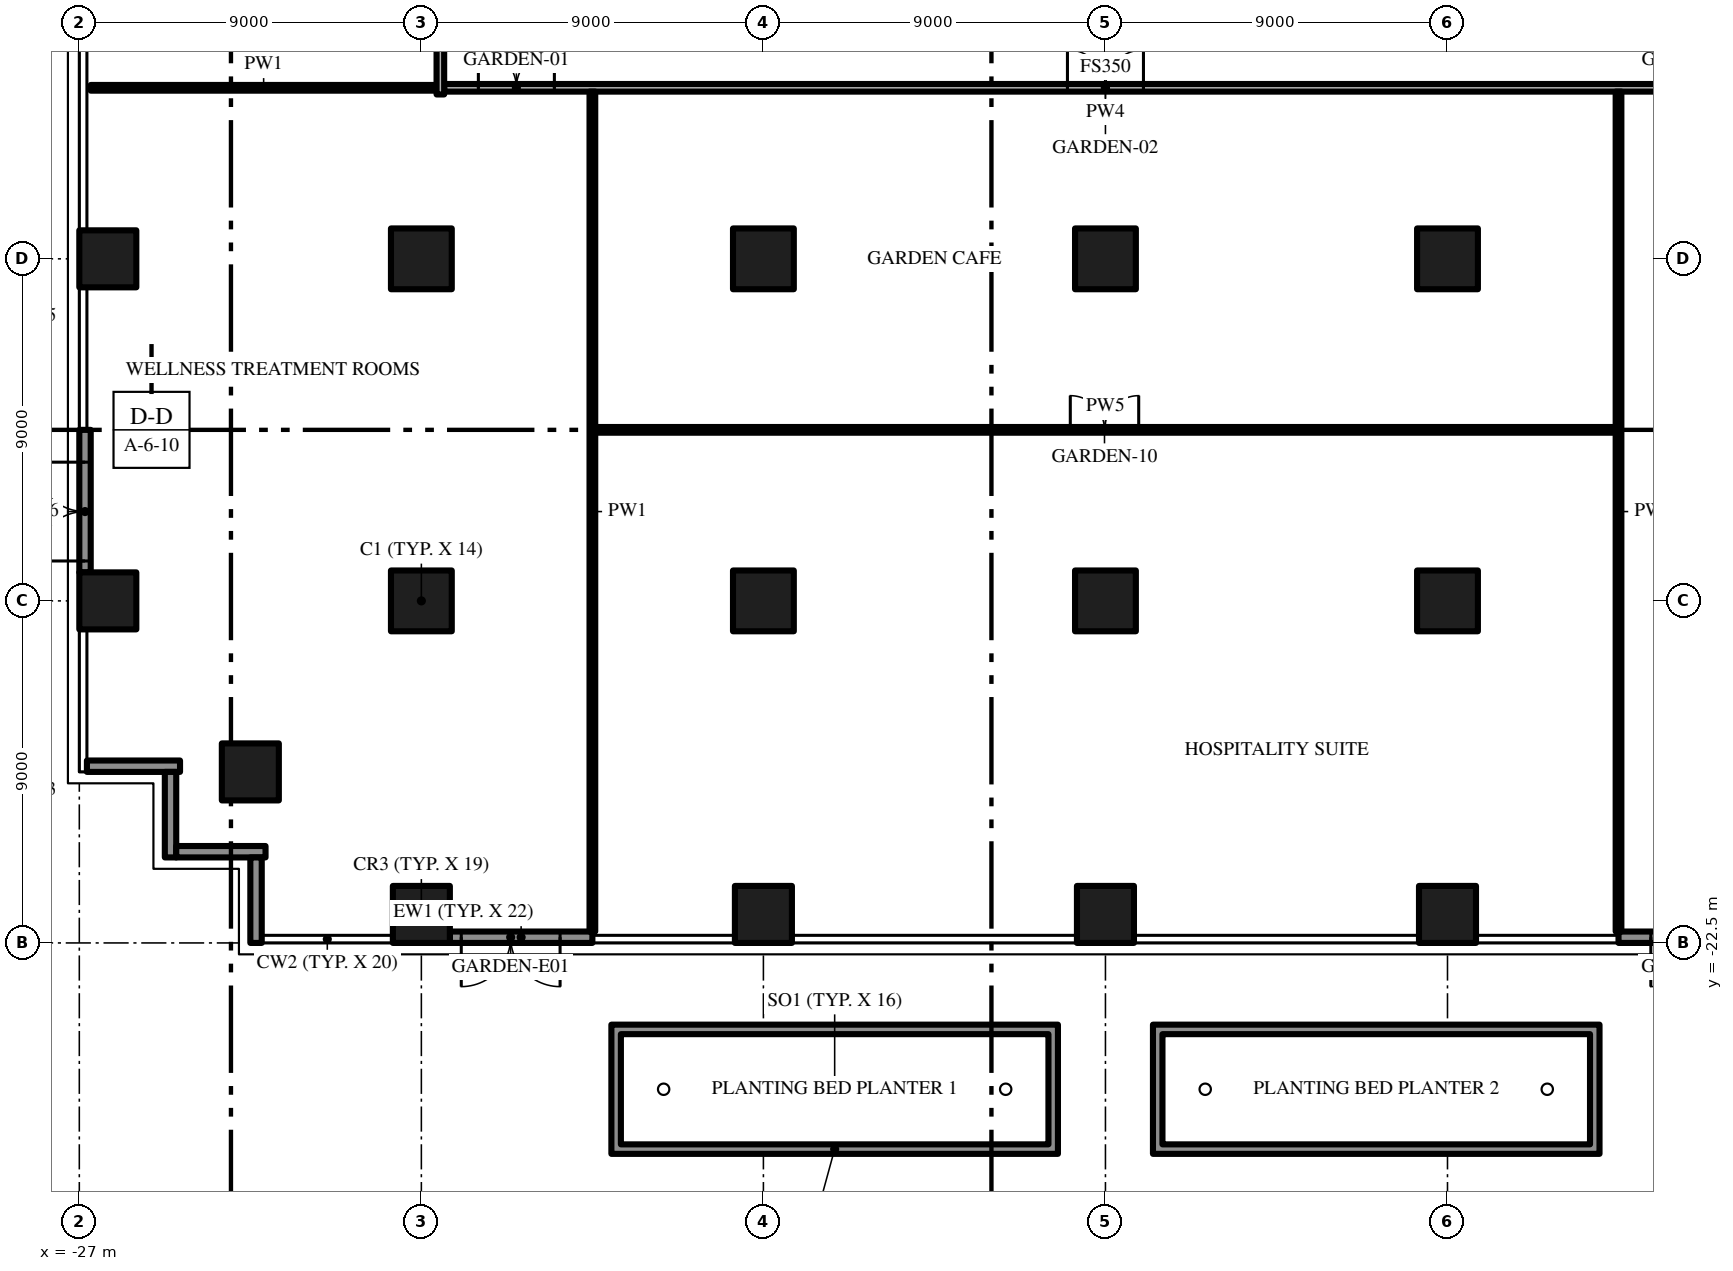
"""IFC4 building model, lengths in metres.
Left out: names, types, materials, properties, quantities, classifications, styles, units other than length and angle.
Written with IfcOpenShell. Run it as: python <this file> out.ifc"""

import sys

from ifc_helpers import new_model, si_unit, direction, frame, frame_2d, origin, origin_2d, place, context, subcontext, project, spatial, polyline, rectangle, outline, extrude, element, fill, save


model = new_model("IFC4")
c1 = context("Model", 3, precision=1e-05, world=origin(), true_north=direction((0.0, 1.0)))
c2 = subcontext(c1, "Body", "Model", "MODEL_VIEW")
j1 = project(units=[si_unit("LENGTHUNIT", "METRE"), si_unit("PLANEANGLEUNIT", "RADIAN")], contexts=[c1])
p1 = place(None, origin())
s1 = spatial("IfcSite", under=j1, at=p1, CompositionType="ELEMENT")
p2 = place(p1, origin())
s2 = spatial("IfcBuilding", under=s1, at=p2, CompositionType="ELEMENT")
p3 = place(p2, frame((0.0, 0.0, 10.5)))
s3 = spatial("IfcBuildingStorey", under=s2, at=p3, CompositionType="ELEMENT", Elevation=10.5)
p4 = place(p3, frame((-18.0, -13.5, 0.0), z_axis=(0.0, 0.0, 1.0), x_axis=(1.0, 0.0, 0.0)))
e1 = element("IfcColumn", 1, at=p4, inside=s3, PredefinedType="COLUMN", context=c2, shape_type="SweptSolid", body=[
    extrude(rectangle(XDim=1.6, YDim=1.6, at=origin_2d()), origin(), (0.0, 0.0, 1.0), 4.2),
])
p5 = place(p3, frame((-18.0, -21.75, 0.0), z_axis=(0.0, 0.0, 1.0), x_axis=(1.0, 0.0, 0.0)))
e2 = element("IfcColumn", 2, at=p5, inside=s3, PredefinedType="COLUMN", context=c2, shape_type="SweptSolid", body=[
    extrude(rectangle(XDim=1.5, YDim=1.5, at=origin_2d()), origin(), (0.0, 0.0, 1.0), 4.2),
])
p6 = place(p3, frame((-18.0, -4.5, 0.0), z_axis=(0.0, 0.0, 1.0), x_axis=(1.0, 0.0, 0.0)))
e3 = element("IfcColumn", 3, at=p6, inside=s3, PredefinedType="COLUMN", context=c2, shape_type="SweptSolid", body=[
    extrude(rectangle(XDim=1.6, YDim=1.6, at=origin_2d()), origin(), (0.0, 0.0, 1.0), 4.2),
])
for number, where, z_axis, x_axis in (
    (4, (-26.25, -13.5, 0.0), (0.0, 0.0, 1.0), (1.0, 0.0, 0.0)),
    (5, (-22.5, -18.0, 0.0), (0.0, 0.0, 1.0), (1.0, 0.0, 0.0)),
    (6, (-26.25, -4.5, 0.0), (0.0, 0.0, 1.0), (1.0, 0.0, 0.0)),
):
    element("IfcColumn", number, at=place(p3, frame(where, z_axis=z_axis, x_axis=x_axis)), inside=s3, PredefinedType="COLUMN", context=c2, shape_type="SweptSolid", body=[
        extrude(rectangle(XDim=1.5, YDim=1.5, at=origin_2d()), origin(), (0.0, 0.0, 1.0), 4.2),
    ])
p7 = place(p3, frame((-9.0, -13.5, 0.0), z_axis=(0.0, 0.0, 1.0), x_axis=(1.0, 0.0, 0.0)))
e7 = element("IfcColumn", 7, at=p7, inside=s3, PredefinedType="COLUMN", context=c2, shape_type="SweptSolid", body=[
    extrude(rectangle(XDim=1.6, YDim=1.6, at=origin_2d()), origin(), (0.0, 0.0, 1.0), 4.2),
])
p8 = place(p3, frame((-9.0, -21.75, 0.0), z_axis=(0.0, 0.0, 1.0), x_axis=(1.0, 0.0, 0.0)))
e8 = element("IfcColumn", 8, at=p8, inside=s3, PredefinedType="COLUMN", context=c2, shape_type="SweptSolid", body=[
    extrude(rectangle(XDim=1.5, YDim=1.5, at=origin_2d()), origin(), (0.0, 0.0, 1.0), 4.2),
])
for number, where, z_axis, x_axis in (
    (9, (-9.0, -4.5, 0.0), (0.0, 0.0, 1.0), (1.0, 0.0, 0.0)),
    (10, (0.0, -13.5, 0.0), (0.0, 0.0, 1.0), (1.0, 0.0, 0.0)),
):
    element("IfcColumn", number, at=place(p3, frame(where, z_axis=z_axis, x_axis=x_axis)), inside=s3, PredefinedType="COLUMN", context=c2, shape_type="SweptSolid", body=[
        extrude(rectangle(XDim=1.6, YDim=1.6, at=origin_2d()), origin(), (0.0, 0.0, 1.0), 4.2),
    ])
p9 = place(p3, frame((0.0, -21.75, 0.0), z_axis=(0.0, 0.0, 1.0), x_axis=(1.0, 0.0, 0.0)))
e11 = element("IfcColumn", 11, at=p9, inside=s3, PredefinedType="COLUMN", context=c2, shape_type="SweptSolid", body=[
    extrude(rectangle(XDim=1.5, YDim=1.5, at=origin_2d()), origin(), (0.0, 0.0, 1.0), 4.2),
])
for number, where, z_axis, x_axis in (
    (12, (0.0, -4.5, 0.0), (0.0, 0.0, 1.0), (1.0, 0.0, 0.0)),
    (13, (9.0, -13.5, 0.0), (0.0, 0.0, 1.0), (1.0, 0.0, 0.0)),
):
    element("IfcColumn", number, at=place(p3, frame(where, z_axis=z_axis, x_axis=x_axis)), inside=s3, PredefinedType="COLUMN", context=c2, shape_type="SweptSolid", body=[
        extrude(rectangle(XDim=1.6, YDim=1.6, at=origin_2d()), origin(), (0.0, 0.0, 1.0), 4.2),
    ])
p10 = place(p3, frame((9.0, -21.75, 0.0), z_axis=(0.0, 0.0, 1.0), x_axis=(1.0, 0.0, 0.0)))
e14 = element("IfcColumn", 14, at=p10, inside=s3, PredefinedType="COLUMN", context=c2, shape_type="SweptSolid", body=[
    extrude(rectangle(XDim=1.5, YDim=1.5, at=origin_2d()), origin(), (0.0, 0.0, 1.0), 4.2),
])
p11 = place(p3, frame((9.0, -4.5, 0.0), z_axis=(0.0, 0.0, 1.0), x_axis=(1.0, 0.0, 0.0)))
e15 = element("IfcColumn", 15, at=p11, inside=s3, PredefinedType="COLUMN", context=c2, shape_type="SweptSolid", body=[
    extrude(rectangle(XDim=1.6, YDim=1.6, at=origin_2d()), origin(), (0.0, 0.0, 1.0), 4.2),
])
p12 = place(p3, frame((-13.5, -22.35, 0.0), z_axis=(0.0, 0.0, 1.0), x_axis=(-1.0, 0.0, 0.0)))
e16 = element("IfcWall", 16, at=p12, inside=s3, PredefinedType="SOLIDWALL", context=c2, shape_type="SweptSolid", body=[
    extrude(rectangle(XDim=3.75, YDim=0.3, at=frame_2d((1.875, 0.0))), origin(), (0.0, 0.0, 1.0), 4.2),
])
p13 = place(p12, frame((0.85, 0.0, 0.0)))
e17 = element("IfcOpeningElement", 17, at=p13, cuts=e16, PredefinedType="OPENING", context=c2, shape_type="SweptSolid", body=[
    extrude(rectangle(XDim=2.6, YDim=2.4, at=frame_2d((1.3, 1.2))), frame((0.0, 0.16, 0.0), z_axis=(0.0, -1.0, 0.0), x_axis=(1.0, 0.0, 0.0)), (0.0, 0.0, 1.0), 0.32),
])
p14 = place(p3, frame((17.25, -22.35, 0.0), z_axis=(0.0, 0.0, 1.0), x_axis=(-1.0, 0.0, 0.0)))
e18 = element("IfcWall", 18, at=p14, inside=s3, PredefinedType="SOLIDWALL", context=c2, shape_type="SweptSolid", body=[
    extrude(rectangle(XDim=3.75, YDim=0.3, at=frame_2d((1.875, 0.0))), origin(), (0.0, 0.0, 1.0), 4.2),
])
p15 = place(p14, frame((0.3, 0.0, 0.0)))
e19 = element("IfcOpeningElement", 19, at=p15, cuts=e18, PredefinedType="OPENING", context=c2, shape_type="SweptSolid", body=[
    extrude(rectangle(XDim=2.6, YDim=2.4, at=frame_2d((1.3, 1.2))), frame((0.0, 0.16, 0.0), z_axis=(0.0, -1.0, 0.0), x_axis=(1.0, 0.0, 0.0)), (0.0, 0.0, 1.0), 0.32),
])
p16 = place(p3, frame((-26.85, -12.75, 0.0), z_axis=(0.0, 0.0, 1.0), x_axis=(0.0, 1.0, 0.0)))
e20 = element("IfcWall", 20, at=p16, inside=s3, PredefinedType="SOLIDWALL", context=c2, shape_type="SweptSolid", body=[
    extrude(rectangle(XDim=3.75, YDim=0.3, at=frame_2d((1.875, 0.0))), origin(), (0.0, 0.0, 1.0), 4.2),
])
p17 = place(p16, frame((0.3, 0.0, 0.0)))
e21 = element("IfcOpeningElement", 21, at=p17, cuts=e20, PredefinedType="OPENING", context=c2, shape_type="SweptSolid", body=[
    extrude(rectangle(XDim=2.6, YDim=2.4, at=frame_2d((1.3, 1.2))), frame((0.0, 0.16, 0.0), z_axis=(0.0, -1.0, 0.0), x_axis=(1.0, 0.0, 0.0)), (0.0, 0.0, 1.0), 0.32),
])
p18 = place(p3, frame((-24.35, -17.85, 0.0), z_axis=(0.0, 0.0, 1.0), x_axis=(-1.0, 0.0, 0.0)))
e22 = element("IfcWall", 22, at=p18, inside=s3, PredefinedType="SOLIDWALL", context=c2, shape_type="SweptSolid", body=[
    extrude(rectangle(XDim=2.45, YDim=0.3, at=frame_2d((1.225, 0.0))), origin(), (0.0, 0.0, 1.0), 4.2),
])
p19 = place(p3, frame((-24.6, -20.25, 0.0), z_axis=(0.0, 0.0, 1.0), x_axis=(0.0, 1.0, 0.0)))
e23 = element("IfcWall", 23, at=p19, inside=s3, PredefinedType="SOLIDWALL", context=c2, shape_type="SweptSolid", body=[
    extrude(rectangle(XDim=2.25, YDim=0.3, at=frame_2d((1.125, 0.0))), origin(), (0.0, 0.0, 1.0), 4.2),
])
p20 = place(p3, frame((-22.1, -20.1, 0.0), z_axis=(0.0, 0.0, 1.0), x_axis=(-1.0, 0.0, 0.0)))
e24 = element("IfcWall", 24, at=p20, inside=s3, PredefinedType="SOLIDWALL", context=c2, shape_type="SweptSolid", body=[
    extrude(rectangle(XDim=2.35, YDim=0.3, at=frame_2d((1.175, 0.0))), origin(), (0.0, 0.0, 1.0), 4.2),
])
p21 = place(p3, frame((-22.35, -22.5, 0.0), z_axis=(0.0, 0.0, 1.0), x_axis=(0.0, 1.0, 0.0)))
e25 = element("IfcWall", 25, at=p21, inside=s3, PredefinedType="SOLIDWALL", context=c2, shape_type="SweptSolid", body=[
    extrude(rectangle(XDim=2.25, YDim=0.3, at=frame_2d((1.125, 0.0))), origin(), (0.0, 0.0, 1.0), 4.2),
])
p22 = place(p3, frame((-13.425, -9.0, 0.0), z_axis=(0.0, 0.0, 1.0), x_axis=(1.0, 0.0, 0.0)))
e26 = element("IfcWall", 26, at=p22, inside=s3, PredefinedType="PARTITIONING", context=c2, shape_type="SweptSolid", body=[
    extrude(rectangle(XDim=26.85, YDim=0.15, at=frame_2d((13.425, 0.0))), origin(), (0.0, 0.0, 1.0), 4.2),
])
p23 = place(p22, frame((12.5, 0.0, 0.0)))
e27 = element("IfcOpeningElement", 27, at=p23, cuts=e26, PredefinedType="OPENING", context=c2, shape_type="SweptSolid", body=[
    extrude(rectangle(XDim=1.8, YDim=2.4, at=frame_2d((0.9, 1.2))), frame((0.0, 0.085, 0.0), z_axis=(0.0, -1.0, 0.0), x_axis=(1.0, 0.0, 0.0)), (0.0, 0.0, 1.0), 0.17),
])
p24 = place(p3, frame((-17.4, 0.0, 0.0), z_axis=(0.0, 0.0, 1.0), x_axis=(1.0, 0.0, 0.0)))
e28 = element("IfcWall", 28, at=p24, inside=s3, PredefinedType="PARTITIONING", context=c2, shape_type="SweptSolid", body=[
    extrude(rectangle(XDim=34.8, YDim=0.2, at=frame_2d((17.4, 0.0))), origin(), (0.0, 0.0, 1.0), 4.2),
])
p25 = place(p24, frame((0.9, 0.0, 0.0)))
e29 = element("IfcOpeningElement", 29, at=p25, cuts=e28, PredefinedType="OPENING", context=c2, shape_type="SweptSolid", body=[
    extrude(rectangle(XDim=2.0, YDim=2.4, at=frame_2d((1.0, 1.2))), frame((0.0, 0.11, 0.0), z_axis=(0.0, -1.0, 0.0), x_axis=(1.0, 0.0, 0.0)), (0.0, 0.0, 1.0), 0.22),
])
p26 = place(p24, frame((16.4, 0.0, 0.0)))
e30 = element("IfcOpeningElement", 30, at=p26, cuts=e28, PredefinedType="OPENING", context=c2, shape_type="SweptSolid", body=[
    extrude(rectangle(XDim=2.0, YDim=2.4, at=frame_2d((1.0, 1.2))), frame((0.0, 0.11, 0.0), z_axis=(0.0, -1.0, 0.0), x_axis=(1.0, 0.0, 0.0)), (0.0, 0.0, 1.0), 0.22),
])
p27 = place(p24, frame((31.9, 0.0, 0.0)))
e31 = element("IfcOpeningElement", 31, at=p27, cuts=e28, PredefinedType="OPENING", context=c2, shape_type="SweptSolid", body=[
    extrude(rectangle(XDim=2.0, YDim=2.4, at=frame_2d((1.0, 1.2))), frame((0.0, 0.11, 0.0), z_axis=(0.0, -1.0, 0.0), x_axis=(1.0, 0.0, 0.0)), (0.0, 0.0, 1.0), 0.22),
])
p28 = place(p3, frame((-26.7, 0.0, 0.0), z_axis=(0.0, 0.0, 1.0), x_axis=(1.0, 0.0, 0.0)))
e32 = element("IfcWall", 32, at=p28, inside=s3, PredefinedType="PARTITIONING", context=c2, shape_type="SweptSolid", body=[
    extrude(rectangle(XDim=9.1, YDim=0.15, at=frame_2d((4.55, 0.0))), origin(), (0.0, 0.0, 1.0), 4.2),
])
p29 = place(p3, frame((-17.5, -0.175, 0.0), z_axis=(0.0, 0.0, 1.0), x_axis=(0.0, 1.0, 0.0)))
e33 = element("IfcWall", 33, at=p29, inside=s3, PredefinedType="PARTITIONING", context=c2, shape_type="SweptSolid", body=[
    extrude(rectangle(XDim=3.875, YDim=0.2, at=frame_2d((1.938, 0.0))), origin(), (0.0, 0.0, 1.0), 4.2),
])
for number, where, z_axis, x_axis in (
    (34, (-13.5, -22.2, 0.0), (0.0, 0.0, 1.0), (0.0, 1.0, 0.0)),
    (35, (13.5, -22.2, 0.0), (0.0, 0.0, 1.0), (0.0, 1.0, 0.0)),
):
    element("IfcWall", number, at=place(p3, frame(where, z_axis=z_axis, x_axis=x_axis)), inside=s3, PredefinedType="PARTITIONING", context=c2, shape_type="SweptSolid", body=[
        extrude(rectangle(XDim=22.1, YDim=0.15, at=frame_2d((11.05, 0.0))), origin(), (0.0, 0.0, 1.0), 4.2),
    ])
p30 = place(p3, frame((0.0, 0.0, 0.05)))
e36 = element("IfcWall", 36, at=p30, inside=s3, PredefinedType="USERDEFINED", context=c2, shape_type="SweptSolid", body=[
    extrude(outline(polyline([(-13.0, -28.05), (-1.25, -28.05), (-1.25, -24.65), (-13.0, -24.65), (-13.0, -28.05)]), holes=[polyline([(-12.75, -24.9), (-1.5, -24.9), (-1.5, -27.8), (-12.75, -27.8), (-12.75, -24.9)])]), origin(), (0.0, 0.0, 1.0), 0.9),
])
p31 = place(p3, frame((0.0, 0.0, 0.05)))
e37 = element("IfcWall", 37, at=p31, inside=s3, PredefinedType="USERDEFINED", context=c2, shape_type="SweptSolid", body=[
    extrude(outline(polyline([(1.25, -28.05), (13.0, -28.05), (13.0, -24.65), (1.25, -24.65), (1.25, -28.05)]), holes=[polyline([(1.5, -24.9), (12.75, -24.9), (12.75, -27.8), (1.5, -27.8), (1.5, -24.9)])]), origin(), (0.0, 0.0, 1.0), 0.9),
])
p32 = place(p13, origin())
e38 = element("IfcDoor", 38, at=p32, inside=s3, OperationType="SINGLE_SWING_LEFT", PredefinedType="DOOR", context=c2, shape_type="SweptSolid", body=[
    extrude(rectangle(XDim=2.6, YDim=2.4, at=frame_2d((1.3, 1.2))), frame((0.0, 0.025, 0.0), z_axis=(0.0, -1.0, 0.0), x_axis=(1.0, 0.0, 0.0)), (0.0, 0.0, 1.0), 0.05),
])
fill(e17, e38)
p33 = place(p15, origin())
e39 = element("IfcDoor", 39, at=p33, inside=s3, OperationType="SINGLE_SWING_LEFT", PredefinedType="DOOR", context=c2, shape_type="SweptSolid", body=[
    extrude(rectangle(XDim=2.6, YDim=2.4, at=frame_2d((1.3, 1.2))), frame((0.0, 0.025, 0.0), z_axis=(0.0, -1.0, 0.0), x_axis=(1.0, 0.0, 0.0)), (0.0, 0.0, 1.0), 0.05),
])
fill(e19, e39)
p34 = place(p17, origin())
e40 = element("IfcDoor", 40, at=p34, inside=s3, OperationType="SINGLE_SWING_LEFT", PredefinedType="DOOR", context=c2, shape_type="SweptSolid", body=[
    extrude(rectangle(XDim=2.6, YDim=2.4, at=frame_2d((1.3, 1.2))), frame((0.0, 0.025, 0.0), z_axis=(0.0, -1.0, 0.0), x_axis=(1.0, 0.0, 0.0)), (0.0, 0.0, 1.0), 0.05),
])
fill(e21, e40)
p35 = place(p25, origin())
e41 = element("IfcDoor", 41, at=p35, inside=s3, OperationType="DOUBLE_DOOR_SINGLE_SWING", PredefinedType="DOOR", context=c2, shape_type="SweptSolid", body=[
    extrude(rectangle(XDim=2.0, YDim=2.4, at=frame_2d((1.0, 1.2))), frame((0.0, 0.025, 0.0), z_axis=(0.0, -1.0, 0.0), x_axis=(1.0, 0.0, 0.0)), (0.0, 0.0, 1.0), 0.05),
])
fill(e29, e41)
p36 = place(p26, origin())
e42 = element("IfcDoor", 42, at=p36, inside=s3, OperationType="DOUBLE_DOOR_SINGLE_SWING", PredefinedType="DOOR", context=c2, shape_type="SweptSolid", body=[
    extrude(rectangle(XDim=2.0, YDim=2.4, at=frame_2d((1.0, 1.2))), frame((0.0, 0.025, 0.0), z_axis=(0.0, -1.0, 0.0), x_axis=(1.0, 0.0, 0.0)), (0.0, 0.0, 1.0), 0.05),
])
fill(e30, e42)
p37 = place(p23, origin())
e43 = element("IfcDoor", 43, at=p37, inside=s3, OperationType="DOUBLE_DOOR_SINGLE_SWING", PredefinedType="DOOR", context=c2, shape_type="SweptSolid", body=[
    extrude(rectangle(XDim=1.8, YDim=2.4, at=frame_2d((0.9, 1.2))), frame((0.0, 0.025, 0.0), z_axis=(0.0, -1.0, 0.0), x_axis=(1.0, 0.0, 0.0)), (0.0, 0.0, 1.0), 0.05),
])
fill(e27, e43)
save(model, sys.argv[1])
